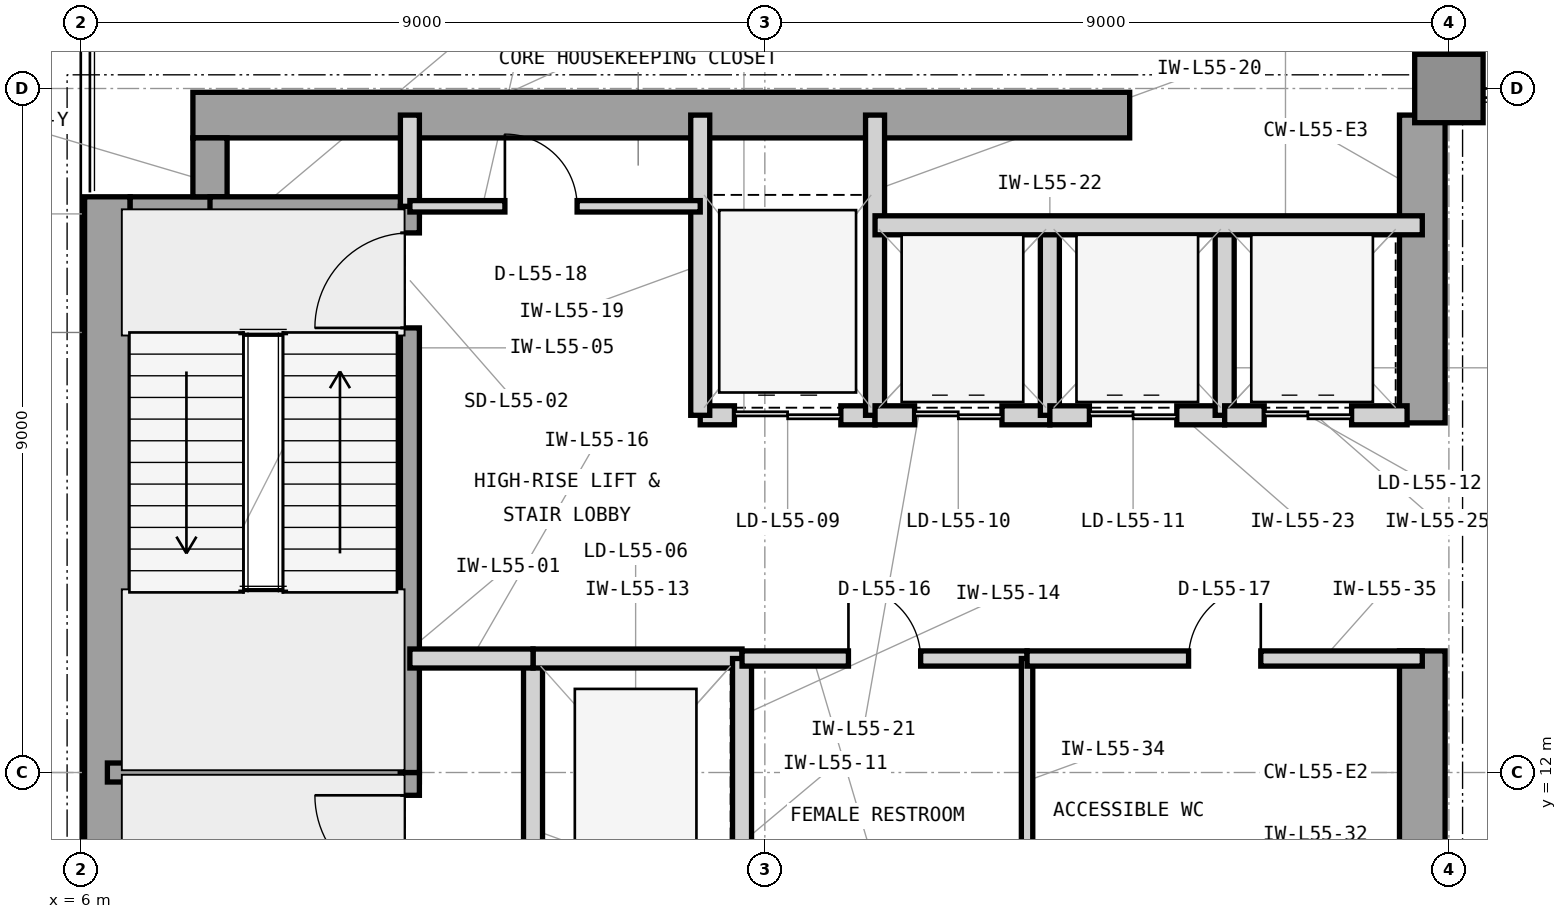
"""IFC4 building model, lengths in metres.
Left out: names, types, materials, properties, quantities, classifications, styles, units other than length and angle.
Written with IfcOpenShell. Run it as: python <this file> out.ifc"""

import sys

from ifc_helpers import new_model, si_unit, direction, frame, frame_2d, origin, origin_2d, place, context, subcontext, project, spatial, rectangle, extrude, element, fill, save


model = new_model("IFC4")
c1 = context("Model", 3, precision=1e-05, world=origin(), true_north=direction((0.0, 1.0)))
c2 = subcontext(c1, "Body", "Model", "MODEL_VIEW")
j1 = project(units=[si_unit("LENGTHUNIT", "METRE"), si_unit("PLANEANGLEUNIT", "RADIAN")], contexts=[c1])
p1 = place(None, origin())
s1 = spatial("IfcSite", under=j1, at=p1, CompositionType="ELEMENT")
p2 = place(p1, origin())
s2 = spatial("IfcBuilding", under=s1, at=p2, CompositionType="ELEMENT")
p3 = place(p2, frame((0.0, 0.0, 226.8)))
s3 = spatial("IfcBuildingStorey", under=s2, at=p3, CompositionType="ELEMENT", Elevation=226.8)
p4 = place(p3, frame((6.35, 4.425, 0.0), z_axis=(0.0, 0.0, 1.0), x_axis=(0.0, 1.0, 0.0)))
e1 = element("IfcWall", 1, at=p4, inside=s3, PredefinedType="SHEAR", context=c2, shape_type="SweptSolid", body=[
    extrude(rectangle(XDim=15.15, YDim=0.6, at=frame_2d((7.575, 0.0))), origin(), (0.0, 0.0, 1.0), 4.5),
])
p5 = place(p3, frame((7.475, 20.65, 0.0), z_axis=(0.0, 0.0, 1.0), x_axis=(1.0, 0.0, 0.0)))
e2 = element("IfcWall", 2, at=p5, inside=s3, PredefinedType="SHEAR", context=c2, shape_type="SweptSolid", body=[
    extrude(rectangle(XDim=12.325, YDim=0.6, at=frame_2d((6.163, 0.0))), origin(), (0.0, 0.0, 1.0), 4.5),
])
p6 = place(p3, frame((23.65, 10.4, 0.0), z_axis=(0.0, 0.0, 1.0), x_axis=(0.0, 1.0, 0.0)))
e3 = element("IfcWall", 3, at=p6, inside=s3, PredefinedType="SHEAR", context=c2, shape_type="SweptSolid", body=[
    extrude(rectangle(XDim=3.2, YDim=0.6, at=frame_2d((1.6, 0.0))), origin(), (0.0, 0.0, 1.0), 4.5),
])
p7 = place(p3, frame((23.65, 16.6, 0.0), z_axis=(0.0, 0.0, 1.0), x_axis=(0.0, 1.0, 0.0)))
e4 = element("IfcWall", 4, at=p7, inside=s3, PredefinedType="SHEAR", context=c2, shape_type="SweptSolid", body=[
    extrude(rectangle(XDim=4.05, YDim=0.6, at=frame_2d((2.025, 0.0))), origin(), (0.0, 0.0, 1.0), 4.5),
])
p8 = place(p3, frame((6.65, 19.35, 0.0), z_axis=(0.0, 0.0, 1.0), x_axis=(1.0, 0.0, 0.0)))
e5 = element("IfcWall", 5, at=p8, inside=s3, PredefinedType="SHEAR", context=c2, shape_type="SweptSolid", body=[
    extrude(rectangle(XDim=1.275, YDim=0.45, at=frame_2d((0.638, 0.0))), origin(), (0.0, 0.0, 1.0), 4.5),
])
p9 = place(p3, frame((7.7, 19.575, 0.0), z_axis=(0.0, 0.0, 1.0), x_axis=(0.0, 1.0, 0.0)))
e6 = element("IfcWall", 6, at=p9, inside=s3, PredefinedType="SHEAR", context=c2, shape_type="SweptSolid", body=[
    extrude(rectangle(XDim=0.775, YDim=0.45, at=frame_2d((0.388, 0.0))), origin(), (0.0, 0.0, 1.0), 4.5),
])
p10 = place(p3, frame((24.0, 21.0, 0.0), z_axis=(0.0, 0.0, 1.0), x_axis=(1.0, 0.0, 0.0)))
e7 = element("IfcColumn", 7, at=p10, inside=s3, PredefinedType="COLUMN", context=c2, shape_type="SweptSolid", body=[
    extrude(rectangle(XDim=0.9, YDim=0.9, at=origin_2d()), origin(), (0.0, 0.0, 1.0), 4.5),
])
p11 = place(p3, frame((6.35, 12.0, 0.0), z_axis=(0.0, 0.0, 1.0), x_axis=(1.0, 0.0, 0.0)))
e8 = element("IfcWall", 8, at=p11, inside=s3, PredefinedType="SHEAR", context=c2, shape_type="SweptSolid", body=[
    extrude(rectangle(XDim=4.105, YDim=0.25, at=frame_2d((2.052, 0.0))), origin(), (0.0, 0.0, 1.0), 4.5),
])
p12 = place(p3, frame((7.7, 19.45, 0.0), z_axis=(0.0, 0.0, 1.0), x_axis=(1.0, 0.0, 0.0)))
e9 = element("IfcWall", 9, at=p12, inside=s3, PredefinedType="SHEAR", context=c2, shape_type="SweptSolid", body=[
    extrude(rectangle(XDim=2.755, YDim=0.25, at=frame_2d((1.377, 0.0))), origin(), (0.0, 0.0, 1.0), 4.5),
])
p13 = place(p3, frame((10.33, 4.55, 0.0), z_axis=(0.0, 0.0, 1.0), x_axis=(0.0, 1.0, 0.0)))
e10 = element("IfcWall", 10, at=p13, inside=s3, PredefinedType="SHEAR", context=c2, shape_type="SweptSolid", body=[
    extrude(rectangle(XDim=7.45, YDim=0.25, at=frame_2d((3.725, 0.0))), origin(), (0.0, 0.0, 1.0), 4.5),
])
p14 = place(p13, frame((5.9, 0.0, 0.0)))
e11 = element("IfcOpeningElement", 11, at=p14, cuts=e10, PredefinedType="OPENING", context=c2, shape_type="SweptSolid", body=[
    extrude(rectangle(XDim=1.25, YDim=2.2, at=frame_2d((0.625, 1.1))), frame((0.0, 0.135, 0.0), z_axis=(0.0, -1.0, 0.0), x_axis=(1.0, 0.0, 0.0)), (0.0, 0.0, 1.0), 0.27),
])
p15 = place(p3, frame((10.33, 12.0, 0.0), z_axis=(0.0, 0.0, 1.0), x_axis=(0.0, 1.0, 0.0)))
e12 = element("IfcWall", 12, at=p15, inside=s3, PredefinedType="SHEAR", context=c2, shape_type="SweptSolid", body=[
    extrude(rectangle(XDim=7.45, YDim=0.25, at=frame_2d((3.725, 0.0))), origin(), (0.0, 0.0, 1.0), 4.5),
])
p16 = place(p15, frame((5.85, 0.0, 0.0)))
e13 = element("IfcOpeningElement", 13, at=p16, cuts=e12, PredefinedType="OPENING", context=c2, shape_type="SweptSolid", body=[
    extrude(rectangle(XDim=1.25, YDim=2.2, at=frame_2d((0.625, 1.1))), frame((0.0, 0.135, 0.0), z_axis=(0.0, -1.0, 0.0), x_axis=(1.0, 0.0, 0.0)), (0.0, 0.0, 1.0), 0.27),
])
p17 = place(p3, frame((10.33, 19.45, 0.0), z_axis=(0.0, 0.0, 1.0), x_axis=(0.0, 1.0, 0.0)))
e14 = element("IfcWall", 14, at=p17, inside=s3, PredefinedType="PARTITIONING", context=c2, shape_type="SweptSolid", body=[
    extrude(rectangle(XDim=1.2, YDim=0.25, at=frame_2d((0.6, 0.0))), origin(), (0.0, 0.0, 1.0), 4.29),
])
p18 = place(p3, frame((11.95, 10.5, 0.0), z_axis=(0.0, 0.0, 1.0), x_axis=(0.0, 1.0, 0.0)))
e15 = element("IfcWall", 15, at=p18, inside=s3, PredefinedType="PARTITIONING", context=c2, shape_type="SweptSolid", body=[
    extrude(rectangle(XDim=3.0, YDim=0.25, at=frame_2d((1.5, 0.0))), origin(), (0.0, 0.0, 1.0), 4.29),
])
p19 = place(p3, frame((11.95, 13.5, 0.0), z_axis=(0.0, 0.0, 1.0), x_axis=(1.0, 0.0, 0.0)))
e16 = element("IfcWall", 16, at=p19, inside=s3, PredefinedType="PARTITIONING", context=c2, shape_type="SweptSolid", body=[
    extrude(rectangle(XDim=2.75, YDim=0.25, at=frame_2d((1.375, 0.0))), origin(), (0.0, 0.0, 1.0), 3.673),
])
p20 = place(p3, frame((14.7, 10.5, 0.0), z_axis=(0.0, 0.0, 1.0), x_axis=(0.0, 1.0, 0.0)))
e17 = element("IfcWall", 17, at=p20, inside=s3, PredefinedType="PARTITIONING", context=c2, shape_type="SweptSolid", body=[
    extrude(rectangle(XDim=3.0, YDim=0.25, at=frame_2d((1.5, 0.0))), origin(), (0.0, 0.0, 1.0), 4.29),
])
p21 = place(p3, frame((10.33, 13.5, 0.0), z_axis=(0.0, 0.0, 1.0), x_axis=(1.0, 0.0, 0.0)))
e18 = element("IfcWall", 18, at=p21, inside=s3, PredefinedType="PARTITIONING", context=c2, shape_type="SweptSolid", body=[
    extrude(rectangle(XDim=1.62, YDim=0.25, at=frame_2d((0.81, 0.0))), origin(), (0.0, 0.0, 1.0), 3.673),
])
p22 = place(p3, frame((14.15, 16.7, 0.0), z_axis=(0.0, 0.0, 1.0), x_axis=(1.0, 0.0, 0.0)))
e19 = element("IfcWall", 19, at=p22, inside=s3, PredefinedType="PARTITIONING", context=c2, shape_type="SweptSolid", body=[
    extrude(rectangle(XDim=2.3, YDim=0.25, at=frame_2d((1.15, 0.0))), origin(), (0.0, 0.0, 1.0), 3.673),
])
p23 = place(p22, frame((0.45, 0.0, 0.0)))
e20 = element("IfcOpeningElement", 20, at=p23, cuts=e19, PredefinedType="OPENING", context=c2, shape_type="SweptSolid", body=[
    extrude(rectangle(XDim=1.4, YDim=2.35, at=frame_2d((0.7, 1.175))), frame((0.0, 0.135, 0.0), z_axis=(0.0, -1.0, 0.0), x_axis=(1.0, 0.0, 0.0)), (0.0, 0.0, 1.0), 0.27),
])
for number, where, z_axis, x_axis in (
    (21, (14.15, 16.7, 0.0), (0.0, 0.0, 1.0), (0.0, 1.0, 0.0)),
    (22, (16.45, 16.7, 0.0), (0.0, 0.0, 1.0), (0.0, 1.0, 0.0)),
):
    element("IfcWall", number, at=place(p3, frame(where, z_axis=z_axis, x_axis=x_axis)), inside=s3, PredefinedType="PARTITIONING", context=c2, shape_type="SweptSolid", body=[
        extrude(rectangle(XDim=3.95, YDim=0.25, at=frame_2d((1.975, 0.0))), origin(), (0.0, 0.0, 1.0), 4.29),
    ])
p24 = place(p3, frame((16.45, 16.7, 0.0), z_axis=(0.0, 0.0, 1.0), x_axis=(1.0, 0.0, 0.0)))
e23 = element("IfcWall", 23, at=p24, inside=s3, PredefinedType="PARTITIONING", context=c2, shape_type="SweptSolid", body=[
    extrude(rectangle(XDim=2.3, YDim=0.25, at=frame_2d((1.15, 0.0))), origin(), (0.0, 0.0, 1.0), 3.673),
])
p25 = place(p24, frame((0.52, 0.0, 0.0)))
e24 = element("IfcOpeningElement", 24, at=p25, cuts=e23, PredefinedType="OPENING", context=c2, shape_type="SweptSolid", body=[
    extrude(rectangle(XDim=1.15, YDim=2.25, at=frame_2d((0.575, 1.125))), frame((0.0, 0.135, 0.0), z_axis=(0.0, -1.0, 0.0), x_axis=(1.0, 0.0, 0.0)), (0.0, 0.0, 1.0), 0.27),
])
p26 = place(p3, frame((18.75, 16.7, 0.0), z_axis=(0.0, 0.0, 1.0), x_axis=(0.0, 1.0, 0.0)))
e25 = element("IfcWall", 25, at=p26, inside=s3, PredefinedType="PARTITIONING", context=c2, shape_type="SweptSolid", body=[
    extrude(rectangle(XDim=2.5, YDim=0.25, at=frame_2d((1.25, 0.0))), origin(), (0.0, 0.0, 1.0), 4.29),
])
p27 = place(p3, frame((18.75, 16.7, 0.0), z_axis=(0.0, 0.0, 1.0), x_axis=(1.0, 0.0, 0.0)))
e26 = element("IfcWall", 26, at=p27, inside=s3, PredefinedType="PARTITIONING", context=c2, shape_type="SweptSolid", body=[
    extrude(rectangle(XDim=2.3, YDim=0.25, at=frame_2d((1.15, 0.0))), origin(), (0.0, 0.0, 1.0), 3.673),
])
p28 = place(p27, frame((0.52, 0.0, 0.0)))
e27 = element("IfcOpeningElement", 27, at=p28, cuts=e26, PredefinedType="OPENING", context=c2, shape_type="SweptSolid", body=[
    extrude(rectangle(XDim=1.15, YDim=2.25, at=frame_2d((0.575, 1.125))), frame((0.0, 0.135, 0.0), z_axis=(0.0, -1.0, 0.0), x_axis=(1.0, 0.0, 0.0)), (0.0, 0.0, 1.0), 0.27),
])
p29 = place(p3, frame((21.05, 16.7, 0.0), z_axis=(0.0, 0.0, 1.0), x_axis=(0.0, 1.0, 0.0)))
e28 = element("IfcWall", 28, at=p29, inside=s3, PredefinedType="PARTITIONING", context=c2, shape_type="SweptSolid", body=[
    extrude(rectangle(XDim=2.5, YDim=0.25, at=frame_2d((1.25, 0.0))), origin(), (0.0, 0.0, 1.0), 4.29),
])
p30 = place(p3, frame((21.05, 16.7, 0.0), z_axis=(0.0, 0.0, 1.0), x_axis=(1.0, 0.0, 0.0)))
e29 = element("IfcWall", 29, at=p30, inside=s3, PredefinedType="PARTITIONING", context=c2, shape_type="SweptSolid", body=[
    extrude(rectangle(XDim=2.4, YDim=0.25, at=frame_2d((1.2, 0.0))), origin(), (0.0, 0.0, 1.0), 3.673),
])
p31 = place(p30, frame((0.52, 0.0, 0.0)))
e30 = element("IfcOpeningElement", 30, at=p31, cuts=e29, PredefinedType="OPENING", context=c2, shape_type="SweptSolid", body=[
    extrude(rectangle(XDim=1.15, YDim=2.25, at=frame_2d((0.575, 1.125))), frame((0.0, 0.135, 0.0), z_axis=(0.0, -1.0, 0.0), x_axis=(1.0, 0.0, 0.0)), (0.0, 0.0, 1.0), 0.27),
])
p32 = place(p3, frame((16.45, 19.2, 0.0), z_axis=(0.0, 0.0, 1.0), x_axis=(1.0, 0.0, 0.0)))
e31 = element("IfcWall", 31, at=p32, inside=s3, PredefinedType="PARTITIONING", context=c2, shape_type="SweptSolid", body=[
    extrude(rectangle(XDim=7.2, YDim=0.25, at=frame_2d((3.6, 0.0))), origin(), (0.0, 0.0, 1.0), 4.29),
])
p33 = place(p3, frame((14.7, 13.5, 0.0), z_axis=(0.0, 0.0, 1.0), x_axis=(1.0, 0.0, 0.0)))
e32 = element("IfcWall", 32, at=p33, inside=s3, PredefinedType="PARTITIONING", context=c2, shape_type="SweptSolid", body=[
    extrude(rectangle(XDim=3.75, YDim=0.2, at=frame_2d((1.875, 0.0))), origin(), (0.0, 0.0, 1.0), 3.673),
])
p34 = place(p33, frame((1.4, 0.0, 0.0)))
e33 = element("IfcOpeningElement", 33, at=p34, cuts=e32, PredefinedType="OPENING", context=c2, shape_type="SweptSolid", body=[
    extrude(rectangle(XDim=0.95, YDim=2.1, at=frame_2d((0.475, 1.05))), frame((0.0, 0.11, 0.0), z_axis=(0.0, -1.0, 0.0), x_axis=(1.0, 0.0, 0.0)), (0.0, 0.0, 1.0), 0.22),
])
p35 = place(p3, frame((18.45, 10.28, 0.0), z_axis=(0.0, 0.0, 1.0), x_axis=(0.0, 1.0, 0.0)))
e34 = element("IfcWall", 34, at=p35, inside=s3, PredefinedType="PARTITIONING", context=c2, shape_type="SweptSolid", body=[
    extrude(rectangle(XDim=3.22, YDim=0.15, at=frame_2d((1.61, 0.0))), origin(), (0.0, 0.0, 1.0), 4.29),
])
p36 = place(p3, frame((18.45, 13.5, 0.0), z_axis=(0.0, 0.0, 1.0), x_axis=(1.0, 0.0, 0.0)))
e35 = element("IfcWall", 35, at=p36, inside=s3, PredefinedType="PARTITIONING", context=c2, shape_type="SweptSolid", body=[
    extrude(rectangle(XDim=5.2, YDim=0.2, at=frame_2d((2.6, 0.0))), origin(), (0.0, 0.0, 1.0), 3.673),
])
p37 = place(p36, frame((2.125, 0.0, 0.0)))
e36 = element("IfcOpeningElement", 36, at=p37, cuts=e35, PredefinedType="OPENING", context=c2, shape_type="SweptSolid", body=[
    extrude(rectangle(XDim=0.95, YDim=2.1, at=frame_2d((0.475, 1.05))), frame((0.0, 0.11, 0.0), z_axis=(0.0, -1.0, 0.0), x_axis=(1.0, 0.0, 0.0)), (0.0, 0.0, 1.0), 0.22),
])
p38 = place(p3, frame((10.33, 19.45, 0.0), z_axis=(0.0, 0.0, 1.0), x_axis=(1.0, 0.0, 0.0)))
e37 = element("IfcWall", 37, at=p38, inside=s3, PredefinedType="PARTITIONING", context=c2, shape_type="SweptSolid", body=[
    extrude(rectangle(XDim=3.82, YDim=0.15, at=frame_2d((1.91, 0.0))), origin(), (0.0, 0.0, 1.0), 4.29),
])
p39 = place(p38, frame((1.25, 0.0, 0.0)))
e38 = element("IfcOpeningElement", 38, at=p39, cuts=e37, PredefinedType="OPENING", context=c2, shape_type="SweptSolid", body=[
    extrude(rectangle(XDim=0.95, YDim=2.1, at=frame_2d((0.475, 1.05))), frame((0.0, 0.085, 0.0), z_axis=(0.0, -1.0, 0.0), x_axis=(1.0, 0.0, 0.0)), (0.0, 0.0, 1.0), 0.17),
])
p40 = place(p14, origin())
e39 = element("IfcDoor", 39, at=p40, inside=s3, OperationType="SINGLE_SWING_RIGHT", PredefinedType="DOOR", context=c2, shape_type="SweptSolid", body=[
    extrude(rectangle(XDim=1.25, YDim=2.2, at=frame_2d((0.625, 1.1))), frame((0.0, 0.025, 0.0), z_axis=(0.0, -1.0, 0.0), x_axis=(1.0, 0.0, 0.0)), (0.0, 0.0, 1.0), 0.05),
])
fill(e11, e39)
p41 = place(p16, origin())
e40 = element("IfcDoor", 40, at=p41, inside=s3, OperationType="SINGLE_SWING_LEFT", PredefinedType="DOOR", context=c2, shape_type="SweptSolid", body=[
    extrude(rectangle(XDim=1.25, YDim=2.2, at=frame_2d((0.625, 1.1))), frame((0.0, 0.025, 0.0), z_axis=(0.0, -1.0, 0.0), x_axis=(1.0, 0.0, 0.0)), (0.0, 0.0, 1.0), 0.05),
])
fill(e13, e40)
p42 = place(p23, origin())
e41 = element("IfcDoor", 41, at=p42, inside=s3, OperationType="DOUBLE_DOOR_SLIDING", PredefinedType="DOOR", context=c2, shape_type="SweptSolid", body=[
    extrude(rectangle(XDim=1.4, YDim=2.35, at=frame_2d((0.7, 1.175))), frame((0.0, 0.025, 0.0), z_axis=(0.0, -1.0, 0.0), x_axis=(1.0, 0.0, 0.0)), (0.0, 0.0, 1.0), 0.05),
])
fill(e20, e41)
p43 = place(p25, origin())
e42 = element("IfcDoor", 42, at=p43, inside=s3, OperationType="DOUBLE_DOOR_SLIDING", PredefinedType="DOOR", context=c2, shape_type="SweptSolid", body=[
    extrude(rectangle(XDim=1.15, YDim=2.25, at=frame_2d((0.575, 1.125))), frame((0.0, 0.025, 0.0), z_axis=(0.0, -1.0, 0.0), x_axis=(1.0, 0.0, 0.0)), (0.0, 0.0, 1.0), 0.05),
])
fill(e24, e42)
p44 = place(p28, origin())
e43 = element("IfcDoor", 43, at=p44, inside=s3, OperationType="DOUBLE_DOOR_SLIDING", PredefinedType="DOOR", context=c2, shape_type="SweptSolid", body=[
    extrude(rectangle(XDim=1.15, YDim=2.25, at=frame_2d((0.575, 1.125))), frame((0.0, 0.025, 0.0), z_axis=(0.0, -1.0, 0.0), x_axis=(1.0, 0.0, 0.0)), (0.0, 0.0, 1.0), 0.05),
])
fill(e27, e43)
p45 = place(p31, origin())
e44 = element("IfcDoor", 44, at=p45, inside=s3, OperationType="DOUBLE_DOOR_SLIDING", PredefinedType="DOOR", context=c2, shape_type="SweptSolid", body=[
    extrude(rectangle(XDim=1.15, YDim=2.25, at=frame_2d((0.575, 1.125))), frame((0.0, 0.025, 0.0), z_axis=(0.0, -1.0, 0.0), x_axis=(1.0, 0.0, 0.0)), (0.0, 0.0, 1.0), 0.05),
])
fill(e30, e44)
p46 = place(p34, origin())
e45 = element("IfcDoor", 45, at=p46, inside=s3, OperationType="SINGLE_SWING_LEFT", PredefinedType="DOOR", context=c2, shape_type="SweptSolid", body=[
    extrude(rectangle(XDim=0.95, YDim=2.1, at=frame_2d((0.475, 1.05))), frame((0.0, 0.025, 0.0), z_axis=(0.0, -1.0, 0.0), x_axis=(1.0, 0.0, 0.0)), (0.0, 0.0, 1.0), 0.05),
])
fill(e33, e45)
p47 = place(p37, origin())
e46 = element("IfcDoor", 46, at=p47, inside=s3, OperationType="SINGLE_SWING_RIGHT", PredefinedType="DOOR", context=c2, shape_type="SweptSolid", body=[
    extrude(rectangle(XDim=0.95, YDim=2.1, at=frame_2d((0.475, 1.05))), frame((0.0, 0.025, 0.0), z_axis=(0.0, -1.0, 0.0), x_axis=(1.0, 0.0, 0.0)), (0.0, 0.0, 1.0), 0.05),
])
fill(e36, e46)
p48 = place(p39, origin())
e47 = element("IfcDoor", 47, at=p48, inside=s3, OperationType="SINGLE_SWING_LEFT", PredefinedType="DOOR", context=c2, shape_type="SweptSolid", body=[
    extrude(rectangle(XDim=0.95, YDim=2.1, at=frame_2d((0.475, 1.05))), frame((0.0, 0.025, 0.0), z_axis=(0.0, -1.0, 0.0), x_axis=(1.0, 0.0, 0.0)), (0.0, 0.0, 1.0), 0.05),
])
fill(e38, e47)
save(model, sys.argv[1])
